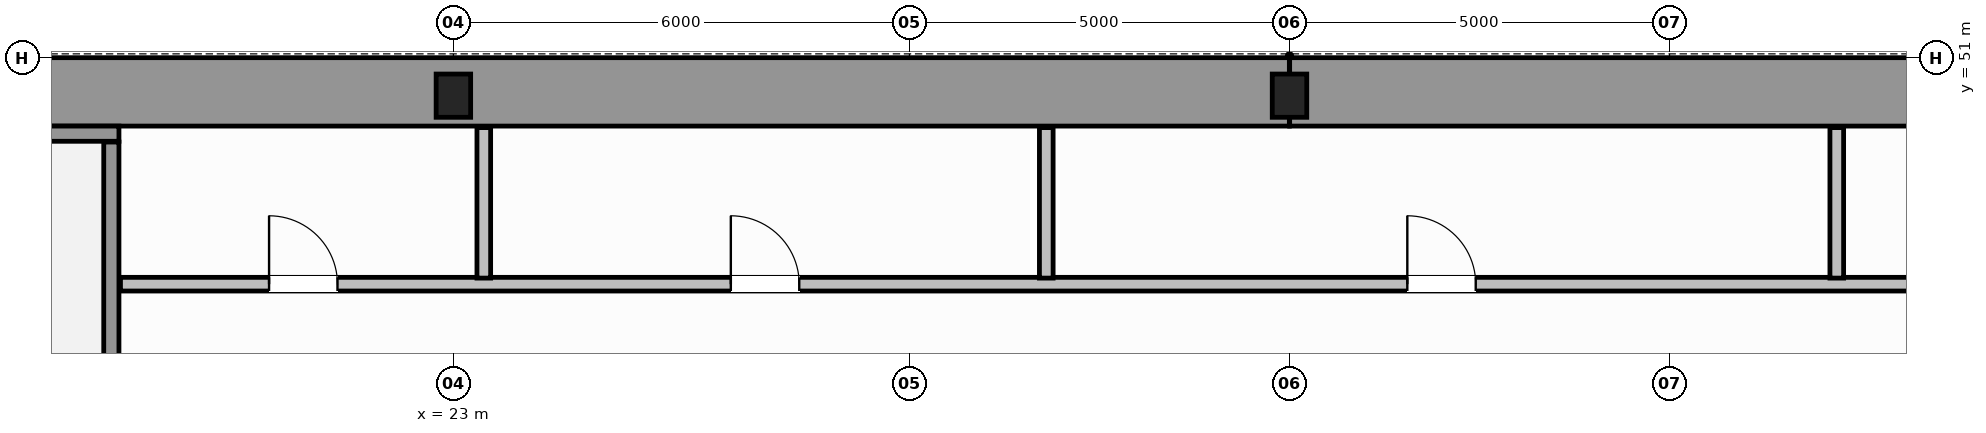
"""IFC4 building model, lengths in metres.
Left out: names, types, materials, properties, quantities, classifications, styles, units other than length and angle.
Written with IfcOpenShell. Run it as: python <this file> out.ifc"""

import sys

from ifc_helpers import new_model, si_unit, direction, frame, frame_2d, origin, origin_2d, place, context, subcontext, project, spatial, rectangle, i_section, extrude, source, transform, mapped, element, fill, save


model = new_model("IFC4")
c1 = context("Model", 3, precision=1e-05, world=origin(), true_north=direction((0.0, 1.0)))
c2 = subcontext(c1, "Body", "Model", "MODEL_VIEW")
j1 = project(units=[si_unit("LENGTHUNIT", "METRE"), si_unit("PLANEANGLEUNIT", "RADIAN")], contexts=[c1])
p1 = place(None, origin())
s1 = spatial("IfcSite", under=j1, at=p1, CompositionType="ELEMENT")
p2 = place(p1, origin())
s2 = spatial("IfcBuilding", under=s1, at=p2, CompositionType="ELEMENT")
p3 = place(p2, frame((0.0, 0.0, 22.6)))
s3 = spatial("IfcBuildingStorey", under=s2, at=p3, CompositionType="ELEMENT", Elevation=22.6)
m1 = source(origin(), c2, "Body", "SweptSolid", [
    extrude(i_section(OverallWidth=0.454, OverallDepth=0.569, WebThickness=0.078, FlangeThickness=0.08, FilletRadius=0.015, at=origin_2d()), origin(), (0.0, 0.0, 1.0), 3.8),
])
for number, where, z_axis, x_axis in (
    (1, (23.0, 50.5, 0.0), (0.0, 0.0, 1.0), (1.0, 0.0, 0.0)),
    (2, (34.0, 50.5, 0.0), (0.0, 0.0, 1.0), (1.0, 0.0, 0.0)),
):
    element("IfcColumn", number, at=place(p3, frame(where, z_axis=z_axis, x_axis=x_axis)), inside=s3, PredefinedType="COLUMN", context=c2, shape_type="MappedRepresentation", body=[
        mapped(m1, transform((0.0, 0.0, 0.0), scale=1.0)),
    ])
for number, where, z_axis, x_axis in (
    (3, (14.454, 50.55, 0.0), (0.0, 0.0, 1.0), (1.0, 0.0, 0.0)),
    (4, (34.002, 50.55, 0.0), (0.0, 0.0, 1.0), (1.0, 0.0, 0.0)),
):
    element("IfcWall", number, at=place(p3, frame(where, z_axis=z_axis, x_axis=x_axis)), inside=s3, PredefinedType="SHEAR", context=c2, shape_type="SweptSolid", body=[
        extrude(rectangle(XDim=19.544, YDim=0.9, at=frame_2d((9.772, 0.0))), origin(), (0.0, 0.0, 1.0), 3.8),
    ])
p4 = place(p3, frame((14.45, 50.0, 0.0), z_axis=(0.0, 0.0, 1.0), x_axis=(1.0, 0.0, 0.0)))
e5 = element("IfcWall", 5, at=p4, inside=s3, PredefinedType="SOLIDWALL", context=c2, shape_type="SweptSolid", body=[
    extrude(rectangle(XDim=4.15, YDim=0.2, at=frame_2d((2.075, 0.0))), origin(), (0.0, 0.0, 1.0), 3.8),
])
p5 = place(p3, frame((18.5, 39.96, 0.0), z_axis=(0.0, 0.0, 1.0), x_axis=(0.0, 1.0, 0.0)))
e6 = element("IfcWall", 6, at=p5, inside=s3, PredefinedType="SOLIDWALL", context=c2, shape_type="SweptSolid", body=[
    extrude(rectangle(XDim=9.93, YDim=0.2, at=frame_2d((4.965, 0.0))), origin(), (0.0, 0.0, 1.0), 3.8),
])
p6 = place(p3, frame((18.62, 48.02, 0.0), z_axis=(0.0, 0.0, 1.0), x_axis=(1.0, 0.0, 0.0)))
e7 = element("IfcWall", 7, at=p6, inside=s3, PredefinedType="PLUMBINGWALL", context=c2, shape_type="SweptSolid", body=[
    extrude(rectangle(XDim=30.76, YDim=0.18, at=frame_2d((15.38, 0.0))), origin(), (0.0, 0.0, 1.0), 3.58),
])
p7 = place(p6, frame((1.955, 0.0, 0.0)))
e8 = element("IfcOpeningElement", 8, at=p7, cuts=e7, PredefinedType="OPENING", context=c2, shape_type="SweptSolid", body=[
    extrude(rectangle(XDim=0.9, YDim=2.15, at=frame_2d((0.45, 1.075))), frame((0.0, 0.1, 0.0), z_axis=(0.0, -1.0, 0.0), x_axis=(1.0, 0.0, 0.0)), (0.0, 0.0, 1.0), 0.2),
])
p8 = place(p6, frame((8.03, 0.0, 0.0)))
e9 = element("IfcOpeningElement", 9, at=p8, cuts=e7, PredefinedType="OPENING", context=c2, shape_type="SweptSolid", body=[
    extrude(rectangle(XDim=0.9, YDim=2.15, at=frame_2d((0.45, 1.075))), frame((0.0, 0.1, 0.0), z_axis=(0.0, -1.0, 0.0), x_axis=(1.0, 0.0, 0.0)), (0.0, 0.0, 1.0), 0.2),
])
p9 = place(p6, frame((16.93, 0.0, 0.0)))
e10 = element("IfcOpeningElement", 10, at=p9, cuts=e7, PredefinedType="OPENING", context=c2, shape_type="SweptSolid", body=[
    extrude(rectangle(XDim=0.9, YDim=2.15, at=frame_2d((0.45, 1.075))), frame((0.0, 0.1, 0.0), z_axis=(0.0, -1.0, 0.0), x_axis=(1.0, 0.0, 0.0)), (0.0, 0.0, 1.0), 0.2),
])
p10 = place(p6, frame((26.205, 0.0, 0.0)))
e11 = element("IfcOpeningElement", 11, at=p10, cuts=e7, PredefinedType="OPENING", context=c2, shape_type="SweptSolid", body=[
    extrude(rectangle(XDim=0.9, YDim=2.15, at=frame_2d((0.45, 1.075))), frame((0.0, 0.1, 0.0), z_axis=(0.0, -1.0, 0.0), x_axis=(1.0, 0.0, 0.0)), (0.0, 0.0, 1.0), 0.2),
])
for number, where, z_axis, x_axis in (
    (12, (23.4, 48.1, 0.0), (0.0, 0.0, 1.0), (0.0, 1.0, 0.0)),
    (13, (30.8, 48.1, 0.0), (0.0, 0.0, 1.0), (0.0, 1.0, 0.0)),
    (14, (41.2, 48.1, 0.0), (0.0, 0.0, 1.0), (0.0, 1.0, 0.0)),
):
    element("IfcWall", number, at=place(p3, frame(where, z_axis=z_axis, x_axis=x_axis)), inside=s3, PredefinedType="PLUMBINGWALL", context=c2, shape_type="SweptSolid", body=[
        extrude(rectangle(XDim=1.98, YDim=0.18, at=frame_2d((0.99, 0.0))), origin(), (0.0, 0.0, 1.0), 3.58),
    ])
m2 = source(origin(), c2, "Body", "SweptSolid", [
    extrude(rectangle(XDim=0.9, YDim=2.15, at=frame_2d((0.45, 1.075))), frame((0.0, 0.025, 0.0), z_axis=(0.0, -1.0, 0.0), x_axis=(1.0, 0.0, 0.0)), (0.0, 0.0, 1.0), 0.05),
])
p11 = place(p7, origin())
e15 = element("IfcDoor", 15, at=p11, inside=s3, OperationType="SINGLE_SWING_LEFT", PredefinedType="DOOR", context=c2, shape_type="MappedRepresentation", body=[
    mapped(m2, transform((0.0, 0.0, 0.0), scale=1.0)),
])
fill(e8, e15)
p12 = place(p8, origin())
e16 = element("IfcDoor", 16, at=p12, inside=s3, OperationType="SINGLE_SWING_RIGHT", PredefinedType="DOOR", context=c2, shape_type="MappedRepresentation", body=[
    mapped(m2, transform((0.0, 0.0, 0.0), scale=1.0)),
])
fill(e9, e16)
p13 = place(p9, origin())
e17 = element("IfcDoor", 17, at=p13, inside=s3, OperationType="SINGLE_SWING_LEFT", PredefinedType="DOOR", context=c2, shape_type="MappedRepresentation", body=[
    mapped(m2, transform((0.0, 0.0, 0.0), scale=1.0)),
])
fill(e10, e17)
save(model, sys.argv[1])
